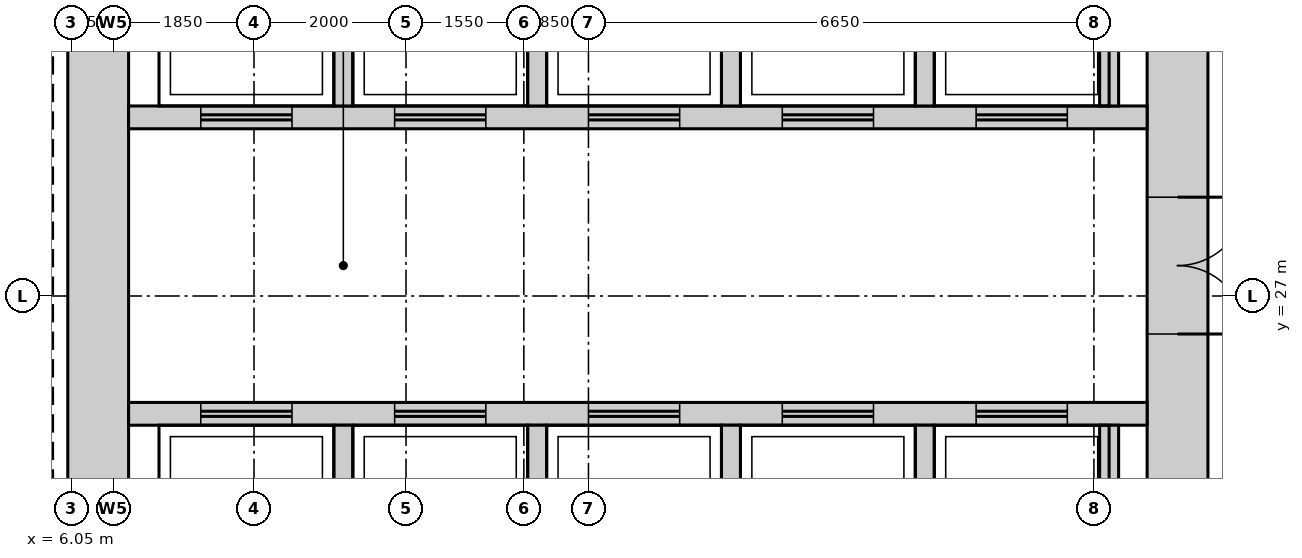
"""IFC4 building model, lengths in metres.
Left out: names, types, materials, properties, quantities, classifications, styles, units other than length and angle.
Written with IfcOpenShell. Run it as: python <this file> out.ifc"""

import sys

from ifc_helpers import new_model, si_unit, direction, frame, frame_2d, origin, place, context, subcontext, project, spatial, rectangle, extrude, source, transform, mapped, element, fill, save


model = new_model("IFC4")
c1 = context("Model", 3, precision=1e-05, world=origin(), true_north=direction((0.0, 1.0)))
c2 = subcontext(c1, "Body", "Model", "MODEL_VIEW")
j1 = project(units=[si_unit("LENGTHUNIT", "METRE"), si_unit("PLANEANGLEUNIT", "RADIAN")], contexts=[c1])
p1 = place(None, origin())
s1 = spatial("IfcSite", under=j1, at=p1, CompositionType="ELEMENT")
p2 = place(p1, origin())
s2 = spatial("IfcBuilding", under=s1, at=p2, CompositionType="ELEMENT")
p3 = place(p2, frame((0.0, 0.0, 164.7)))
s3 = spatial("IfcBuildingStorey", under=s2, at=p3, CompositionType="ELEMENT", Elevation=164.7)
m1 = source(origin(), c2, "Body", "SweptSolid", [
    extrude(rectangle(XDim=22.4, YDim=0.8, at=frame_2d((11.2, 0.0))), origin(), (0.0, 0.0, 1.0), 3.75),
])
p4 = place(p3, frame((20.6, 15.8, 0.0), z_axis=(0.0, 0.0, 1.0), x_axis=(0.0, 1.0, 0.0)))
e1 = element("IfcWall", 1, at=p4, inside=s3, PredefinedType="SHEAR", context=c2, shape_type="MappedRepresentation", body=[
    mapped(m1, transform((0.0, 0.0, 0.0))),
])
m2 = source(origin(), c2, "Body", "SweptSolid", [
    extrude(rectangle(XDim=1.8, YDim=2.1, at=frame_2d((0.9, 1.05))), frame((0.0, 0.41, 0.0), z_axis=(0.0, -1.0, 0.0), x_axis=(1.0, 0.0, 0.0)), (0.0, 0.0, 1.0), 0.82),
])
p5 = place(p4, frame((10.7, 0.0, 0.0)))
e2 = element("IfcOpeningElement", 2, at=p5, cuts=e1, PredefinedType="OPENING", context=c2, shape_type="MappedRepresentation", body=[
    mapped(m2, transform((0.0, 0.0, 0.0))),
])
m3 = source(origin(), c2, "Body", "SweptSolid", [
    extrude(rectangle(XDim=0.9, YDim=2.1, at=frame_2d((0.45, 1.05))), frame((0.0, 0.41, 0.0), z_axis=(0.0, -1.0, 0.0), x_axis=(1.0, 0.0, 0.0)), (0.0, 0.0, 1.0), 0.82),
])
p6 = place(p4, frame((0.35, 0.0, 0.0)))
e3 = element("IfcOpeningElement", 3, at=p6, cuts=e1, PredefinedType="OPENING", context=c2, shape_type="MappedRepresentation", body=[
    mapped(m3, transform((0.0, 0.0, 0.0))),
])
p7 = place(p4, frame((2.8, 0.0, 0.0)))
e4 = element("IfcOpeningElement", 4, at=p7, cuts=e1, PredefinedType="OPENING", context=c2, shape_type="MappedRepresentation", body=[
    mapped(m3, transform((0.0, 0.0, 0.0))),
])
p8 = place(p4, frame((5.55, 0.0, 0.0)))
e5 = element("IfcOpeningElement", 5, at=p8, cuts=e1, PredefinedType="OPENING", context=c2, shape_type="MappedRepresentation", body=[
    mapped(m3, transform((0.0, 0.0, 0.0))),
])
p9 = place(p3, frame((6.4, 15.8, 0.0), z_axis=(0.0, 0.0, 1.0), x_axis=(0.0, 1.0, 0.0)))
e6 = element("IfcWall", 6, at=p9, inside=s3, PredefinedType="SHEAR", context=c2, shape_type="MappedRepresentation", body=[
    mapped(m1, transform((0.0, 0.0, 0.0))),
])
m4 = source(origin(), c2, "Body", "SweptSolid", [
    extrude(rectangle(XDim=13.4, YDim=0.3, at=frame_2d((6.7, 0.0))), origin(), (0.0, 0.0, 1.0), 3.75),
])
p10 = place(p3, frame((6.8, 29.35, 0.0), z_axis=(0.0, 0.0, 1.0), x_axis=(1.0, 0.0, 0.0)))
e7 = element("IfcWall", 7, at=p10, inside=s3, PredefinedType="STANDARD", context=c2, shape_type="MappedRepresentation", body=[
    mapped(m4, transform((0.0, 0.0, 0.0))),
])
m5 = source(origin(), c2, "Body", "SweptSolid", [
    extrude(rectangle(XDim=1.2, YDim=2.1, at=frame_2d((0.6, 1.05))), frame((0.0, 0.16, 0.0), z_axis=(0.0, -1.0, 0.0), x_axis=(1.0, 0.0, 0.0)), (0.0, 0.0, 1.0), 0.32),
])
p11 = place(p10, frame((0.95, 0.0, 0.0)))
e8 = element("IfcOpeningElement", 8, at=p11, cuts=e7, PredefinedType="OPENING", context=c2, shape_type="MappedRepresentation", body=[
    mapped(m5, transform((0.0, 0.0, 0.0))),
])
p12 = place(p10, frame((3.5, 0.0, 0.0)))
e9 = element("IfcOpeningElement", 9, at=p12, cuts=e7, PredefinedType="OPENING", context=c2, shape_type="MappedRepresentation", body=[
    mapped(m5, transform((0.0, 0.0, 0.0))),
])
p13 = place(p10, frame((6.05, 0.0, 0.0)))
e10 = element("IfcOpeningElement", 10, at=p13, cuts=e7, PredefinedType="OPENING", context=c2, shape_type="MappedRepresentation", body=[
    mapped(m5, transform((0.0, 0.0, 0.0))),
])
p14 = place(p10, frame((8.6, 0.0, 0.0)))
e11 = element("IfcOpeningElement", 11, at=p14, cuts=e7, PredefinedType="OPENING", context=c2, shape_type="MappedRepresentation", body=[
    mapped(m5, transform((0.0, 0.0, 0.0))),
])
p15 = place(p10, frame((11.15, 0.0, 0.0)))
e12 = element("IfcOpeningElement", 12, at=p15, cuts=e7, PredefinedType="OPENING", context=c2, shape_type="MappedRepresentation", body=[
    mapped(m5, transform((0.0, 0.0, 0.0))),
])
p16 = place(p3, frame((6.8, 25.45, 0.0), z_axis=(0.0, 0.0, 1.0), x_axis=(1.0, 0.0, 0.0)))
e13 = element("IfcWall", 13, at=p16, inside=s3, PredefinedType="STANDARD", context=c2, shape_type="MappedRepresentation", body=[
    mapped(m4, transform((0.0, 0.0, 0.0))),
])
p17 = place(p16, frame((0.95, 0.0, 0.0)))
e14 = element("IfcOpeningElement", 14, at=p17, cuts=e13, PredefinedType="OPENING", context=c2, shape_type="MappedRepresentation", body=[
    mapped(m5, transform((0.0, 0.0, 0.0))),
])
p18 = place(p16, frame((3.5, 0.0, 0.0)))
e15 = element("IfcOpeningElement", 15, at=p18, cuts=e13, PredefinedType="OPENING", context=c2, shape_type="MappedRepresentation", body=[
    mapped(m5, transform((0.0, 0.0, 0.0))),
])
p19 = place(p16, frame((6.05, 0.0, 0.0)))
e16 = element("IfcOpeningElement", 16, at=p19, cuts=e13, PredefinedType="OPENING", context=c2, shape_type="MappedRepresentation", body=[
    mapped(m5, transform((0.0, 0.0, 0.0))),
])
p20 = place(p16, frame((8.6, 0.0, 0.0)))
e17 = element("IfcOpeningElement", 17, at=p20, cuts=e13, PredefinedType="OPENING", context=c2, shape_type="MappedRepresentation", body=[
    mapped(m5, transform((0.0, 0.0, 0.0))),
])
p21 = place(p16, frame((11.15, 0.0, 0.0)))
e18 = element("IfcOpeningElement", 18, at=p21, cuts=e13, PredefinedType="OPENING", context=c2, shape_type="MappedRepresentation", body=[
    mapped(m5, transform((0.0, 0.0, 0.0))),
])
m6 = source(origin(), c2, "Body", "SweptSolid", [
    extrude(rectangle(XDim=2.4, YDim=0.25, at=frame_2d((1.2, 0.0))), origin(), (0.0, 0.0, 1.0), 3.75),
])
for number, where, z_axis, x_axis in (
    (19, (17.275, 29.5, 0.0), (0.0, 0.0, 1.0), (0.0, 1.0, 0.0)),
    (20, (19.7, 29.5, 0.0), (0.0, 0.0, 1.0), (0.0, 1.0, 0.0)),
    (21, (9.625, 29.5, 0.0), (0.0, 0.0, 1.0), (0.0, 1.0, 0.0)),
    (22, (12.175, 29.5, 0.0), (0.0, 0.0, 1.0), (0.0, 1.0, 0.0)),
    (23, (14.725, 29.5, 0.0), (0.0, 0.0, 1.0), (0.0, 1.0, 0.0)),
):
    element("IfcWall", number, at=place(p3, frame(where, z_axis=z_axis, x_axis=x_axis)), inside=s3, PredefinedType="STANDARD", context=c2, shape_type="MappedRepresentation", body=[
        mapped(m6, transform((0.0, 0.0, 0.0))),
    ])
m7 = source(origin(), c2, "Body", "SweptSolid", [
    extrude(rectangle(XDim=2.4, YDim=0.25, at=frame_2d((1.2, 0.0))), origin(), (0.0, 0.0, 1.0), 3.75),
])
for number, where, z_axis, x_axis in (
    (24, (17.275, 22.9, 0.0), (0.0, 0.0, 1.0), (0.0, 1.0, 0.0)),
    (25, (19.7, 22.9, 0.0), (0.0, 0.0, 1.0), (0.0, 1.0, 0.0)),
    (26, (9.625, 22.9, 0.0), (0.0, 0.0, 1.0), (0.0, 1.0, 0.0)),
    (27, (12.175, 22.9, 0.0), (0.0, 0.0, 1.0), (0.0, 1.0, 0.0)),
    (28, (14.725, 22.9, 0.0), (0.0, 0.0, 1.0), (0.0, 1.0, 0.0)),
):
    element("IfcWall", number, at=place(p3, frame(where, z_axis=z_axis, x_axis=x_axis)), inside=s3, PredefinedType="STANDARD", context=c2, shape_type="MappedRepresentation", body=[
        mapped(m7, transform((0.0, 0.0, 0.0))),
    ])
m8 = source(origin(), c2, "Body", "SweptSolid", [
    extrude(rectangle(XDim=1.8, YDim=2.1, at=frame_2d((0.9, 1.05))), frame((0.0, 0.35, 0.0), z_axis=(0.0, -1.0, 0.0), x_axis=(1.0, 0.0, 0.0)), (0.0, 0.0, 1.0), 0.7),
])
p22 = place(p5, origin())
e29 = element("IfcDoor", 29, at=p22, inside=s3, OperationType="DOUBLE_DOOR_SINGLE_SWING", PredefinedType="DOOR", context=c2, shape_type="MappedRepresentation", body=[
    mapped(m8, transform((0.0, 0.0, 0.0))),
])
fill(e2, e29)
m9 = source(origin(), c2, "Body", "SweptSolid", [
    extrude(rectangle(XDim=1.2, YDim=2.1, at=frame_2d((0.6, 1.05))), frame((0.0, 0.025, 0.0), z_axis=(0.0, -1.0, 0.0), x_axis=(1.0, 0.0, 0.0)), (0.0, 0.0, 1.0), 0.05),
])
p23 = place(p17, origin())
e30 = element("IfcDoor", 30, at=p23, inside=s3, OperationType="DOUBLE_DOOR_SLIDING", PredefinedType="DOOR", context=c2, shape_type="MappedRepresentation", body=[
    mapped(m9, transform((0.0, 0.0, 0.0))),
])
fill(e14, e30)
p24 = place(p18, origin())
e31 = element("IfcDoor", 31, at=p24, inside=s3, OperationType="DOUBLE_DOOR_SLIDING", PredefinedType="DOOR", context=c2, shape_type="MappedRepresentation", body=[
    mapped(m9, transform((0.0, 0.0, 0.0))),
])
fill(e15, e31)
p25 = place(p19, origin())
e32 = element("IfcDoor", 32, at=p25, inside=s3, OperationType="DOUBLE_DOOR_SLIDING", PredefinedType="DOOR", context=c2, shape_type="MappedRepresentation", body=[
    mapped(m9, transform((0.0, 0.0, 0.0))),
])
fill(e16, e32)
p26 = place(p20, origin())
e33 = element("IfcDoor", 33, at=p26, inside=s3, OperationType="DOUBLE_DOOR_SLIDING", PredefinedType="DOOR", context=c2, shape_type="MappedRepresentation", body=[
    mapped(m9, transform((0.0, 0.0, 0.0))),
])
fill(e17, e33)
p27 = place(p21, origin())
e34 = element("IfcDoor", 34, at=p27, inside=s3, OperationType="DOUBLE_DOOR_SLIDING", PredefinedType="DOOR", context=c2, shape_type="MappedRepresentation", body=[
    mapped(m9, transform((0.0, 0.0, 0.0))),
])
fill(e18, e34)
p28 = place(p11, origin())
e35 = element("IfcDoor", 35, at=p28, inside=s3, OperationType="DOUBLE_DOOR_SLIDING", PredefinedType="DOOR", context=c2, shape_type="MappedRepresentation", body=[
    mapped(m9, transform((0.0, 0.0, 0.0))),
])
fill(e8, e35)
p29 = place(p12, origin())
e36 = element("IfcDoor", 36, at=p29, inside=s3, OperationType="DOUBLE_DOOR_SLIDING", PredefinedType="DOOR", context=c2, shape_type="MappedRepresentation", body=[
    mapped(m9, transform((0.0, 0.0, 0.0))),
])
fill(e9, e36)
p30 = place(p13, origin())
e37 = element("IfcDoor", 37, at=p30, inside=s3, OperationType="DOUBLE_DOOR_SLIDING", PredefinedType="DOOR", context=c2, shape_type="MappedRepresentation", body=[
    mapped(m9, transform((0.0, 0.0, 0.0))),
])
fill(e10, e37)
p31 = place(p14, origin())
e38 = element("IfcDoor", 38, at=p31, inside=s3, OperationType="DOUBLE_DOOR_SLIDING", PredefinedType="DOOR", context=c2, shape_type="MappedRepresentation", body=[
    mapped(m9, transform((0.0, 0.0, 0.0))),
])
fill(e11, e38)
p32 = place(p15, origin())
e39 = element("IfcDoor", 39, at=p32, inside=s3, OperationType="DOUBLE_DOOR_SLIDING", PredefinedType="DOOR", context=c2, shape_type="MappedRepresentation", body=[
    mapped(m9, transform((0.0, 0.0, 0.0))),
])
fill(e12, e39)
save(model, sys.argv[1])
